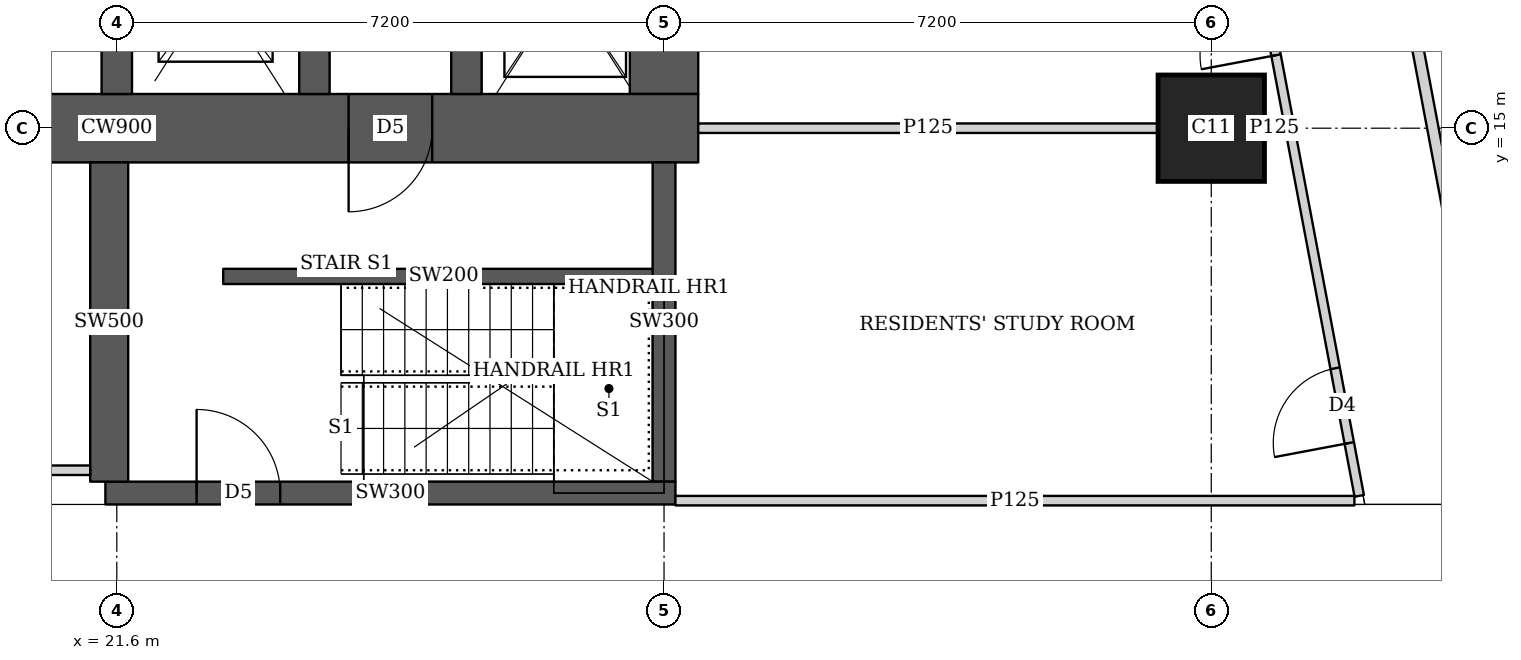
"""IFC4 building model, lengths in metres.
Left out: names, types, materials, properties, quantities, classifications, styles, units other than length and angle.
Written with IfcOpenShell. Run it as: python <this file> out.ifc"""

import sys

from ifc_helpers import new_model, si_unit, direction, frame, frame_2d, origin, origin_2d, place, context, subcontext, project, spatial, rectangle, extrude, element, fill, save


model = new_model("IFC4")
c1 = context("Model", 3, precision=1e-05, world=origin(), true_north=direction((0.0, 1.0)))
c2 = subcontext(c1, "Body", "Model", "MODEL_VIEW")
j1 = project(units=[si_unit("LENGTHUNIT", "METRE"), si_unit("PLANEANGLEUNIT", "RADIAN")], contexts=[c1])
p1 = place(None, origin())
s1 = spatial("IfcSite", under=j1, at=p1, CompositionType="ELEMENT")
p2 = place(p1, origin())
s2 = spatial("IfcBuilding", under=s1, at=p2, CompositionType="ELEMENT")
p3 = place(p2, frame((0.0, 0.0, 281.6)))
s3 = spatial("IfcBuildingStorey", under=s2, at=p3, CompositionType="ELEMENT", Elevation=281.6)
p4 = place(p3, frame((36.0, 15.0, 0.0), z_axis=(0.0, 0.0, 1.0), x_axis=(1.0, 0.0, 0.0)))
e1 = element("IfcColumn", 1, at=p4, inside=s3, PredefinedType="COLUMN", context=c2, shape_type="SweptSolid", body=[
    extrude(rectangle(XDim=1.4, YDim=1.4, at=origin_2d()), origin(), (0.0, 0.0, 1.0), 3.75),
])
p5 = place(p3, frame((13.95, 15.0, 0.0), z_axis=(0.0, 0.0, 1.0), x_axis=(1.0, 0.0, 0.0)))
e2 = element("IfcWall", 2, at=p5, inside=s3, PredefinedType="SHEAR", context=c2, shape_type="SweptSolid", body=[
    extrude(rectangle(XDim=15.3, YDim=0.9, at=frame_2d((7.65, 0.0))), origin(), (0.0, 0.0, 1.0), 3.75),
])
p6 = place(p5, frame((4.45, 0.0, 0.0)))
e3 = element("IfcOpeningElement", 3, at=p6, cuts=e2, PredefinedType="OPENING", context=c2, shape_type="SweptSolid", body=[
    extrude(rectangle(XDim=1.8, YDim=2.1, at=frame_2d((0.9, 1.05))), frame((0.0, 0.46, 0.0), z_axis=(0.0, -1.0, 0.0), x_axis=(1.0, 0.0, 0.0)), (0.0, 0.0, 1.0), 0.92),
])
p7 = place(p5, frame((10.7, 0.0, 0.0)))
e4 = element("IfcOpeningElement", 4, at=p7, cuts=e2, PredefinedType="OPENING", context=c2, shape_type="SweptSolid", body=[
    extrude(rectangle(XDim=1.1, YDim=2.1, at=frame_2d((0.55, 1.05))), frame((0.0, 0.46, 0.0), z_axis=(0.0, -1.0, 0.0), x_axis=(1.0, 0.0, 0.0)), (0.0, 0.0, 1.0), 0.92),
])
p8 = place(p3, frame((28.8, 15.45, 0.0), z_axis=(0.0, 0.0, 1.0), x_axis=(0.0, 1.0, 0.0)))
e5 = element("IfcWall", 5, at=p8, inside=s3, PredefinedType="SHEAR", context=c2, shape_type="SweptSolid", body=[
    extrude(rectangle(XDim=14.1, YDim=0.9, at=frame_2d((7.05, 0.0))), origin(), (0.0, 0.0, 1.0), 3.75),
])
p9 = place(p3, frame((21.6, 15.45, 0.0), z_axis=(0.0, 0.0, 1.0), x_axis=(0.0, 1.0, 0.0)))
e6 = element("IfcWall", 6, at=p9, inside=s3, PredefinedType="SHEAR", context=c2, shape_type="SweptSolid", body=[
    extrude(rectangle(XDim=14.1, YDim=0.4, at=frame_2d((7.05, 0.0))), origin(), (0.0, 0.0, 1.0), 3.75),
])
p10 = place(p9, frame((0.875, 0.0, 0.0)))
e7 = element("IfcOpeningElement", 7, at=p10, cuts=e6, PredefinedType="OPENING", context=c2, shape_type="SweptSolid", body=[
    extrude(rectangle(XDim=1.1, YDim=2.1, at=frame_2d((0.55, 1.05))), frame((0.0, 0.21, 0.0), z_axis=(0.0, -1.0, 0.0), x_axis=(1.0, 0.0, 0.0)), (0.0, 0.0, 1.0), 0.42),
])
p11 = place(p9, frame((4.625, 0.0, 0.0)))
e8 = element("IfcOpeningElement", 8, at=p11, cuts=e6, PredefinedType="OPENING", context=c2, shape_type="SweptSolid", body=[
    extrude(rectangle(XDim=1.1, YDim=2.1, at=frame_2d((0.55, 1.05))), frame((0.0, 0.21, 0.0), z_axis=(0.0, -1.0, 0.0), x_axis=(1.0, 0.0, 0.0)), (0.0, 0.0, 1.0), 0.42),
])
p12 = place(p9, frame((8.375, 0.0, 0.0)))
e9 = element("IfcOpeningElement", 9, at=p12, cuts=e6, PredefinedType="OPENING", context=c2, shape_type="SweptSolid", body=[
    extrude(rectangle(XDim=1.1, YDim=2.1, at=frame_2d((0.55, 1.05))), frame((0.0, 0.21, 0.0), z_axis=(0.0, -1.0, 0.0), x_axis=(1.0, 0.0, 0.0)), (0.0, 0.0, 1.0), 0.42),
])
p13 = place(p9, frame((12.125, 0.0, 0.0)))
e10 = element("IfcOpeningElement", 10, at=p13, cuts=e6, PredefinedType="OPENING", context=c2, shape_type="SweptSolid", body=[
    extrude(rectangle(XDim=1.1, YDim=2.1, at=frame_2d((0.55, 1.05))), frame((0.0, 0.21, 0.0), z_axis=(0.0, -1.0, 0.0), x_axis=(1.0, 0.0, 0.0)), (0.0, 0.0, 1.0), 0.42),
])
p14 = place(p3, frame((24.2, 15.45, 0.0), z_axis=(0.0, 0.0, 1.0), x_axis=(0.0, 1.0, 0.0)))
e11 = element("IfcWall", 11, at=p14, inside=s3, PredefinedType="SHEAR", context=c2, shape_type="SweptSolid", body=[
    extrude(rectangle(XDim=14.1, YDim=0.4, at=frame_2d((7.05, 0.0))), origin(), (0.0, 0.0, 1.0), 3.75),
])
p15 = place(p3, frame((26.2, 15.45, 0.0), z_axis=(0.0, 0.0, 1.0), x_axis=(0.0, 1.0, 0.0)))
e12 = element("IfcWall", 12, at=p15, inside=s3, PredefinedType="SHEAR", context=c2, shape_type="SweptSolid", body=[
    extrude(rectangle(XDim=3.1, YDim=0.4, at=frame_2d((1.55, 0.0))), origin(), (0.0, 0.0, 1.0), 3.75),
])
p16 = place(p15, frame((0.825, 0.0, 0.0)))
e13 = element("IfcOpeningElement", 13, at=p16, cuts=e12, PredefinedType="OPENING", context=c2, shape_type="SweptSolid", body=[
    extrude(rectangle(XDim=1.2, YDim=2.1, at=frame_2d((0.6, 1.05))), frame((0.0, 0.21, 0.0), z_axis=(0.0, -1.0, 0.0), x_axis=(1.0, 0.0, 0.0)), (0.0, 0.0, 1.0), 0.42),
])
p17 = place(p3, frame((21.45, 10.2, 0.0), z_axis=(0.0, 0.0, 1.0), x_axis=(1.0, 0.0, 0.0)))
e14 = element("IfcWall", 14, at=p17, inside=s3, PredefinedType="SHEAR", context=c2, shape_type="SweptSolid", body=[
    extrude(rectangle(XDim=7.5, YDim=0.3, at=frame_2d((3.75, 0.0))), origin(), (0.0, 0.0, 1.0), 3.75),
])
p18 = place(p17, frame((1.2, 0.0, 0.0)))
e15 = element("IfcOpeningElement", 15, at=p18, cuts=e14, PredefinedType="OPENING", context=c2, shape_type="SweptSolid", body=[
    extrude(rectangle(XDim=1.1, YDim=2.1, at=frame_2d((0.55, 1.05))), frame((0.0, 0.16, 0.0), z_axis=(0.0, -1.0, 0.0), x_axis=(1.0, 0.0, 0.0)), (0.0, 0.0, 1.0), 0.32),
])
p19 = place(p3, frame((21.5, 10.35, 0.0), z_axis=(0.0, 0.0, 1.0), x_axis=(0.0, 1.0, 0.0)))
e16 = element("IfcWall", 16, at=p19, inside=s3, PredefinedType="SHEAR", context=c2, shape_type="SweptSolid", body=[
    extrude(rectangle(XDim=4.2, YDim=0.5, at=frame_2d((2.1, 0.0))), origin(), (0.0, 0.0, 1.0), 3.75),
])
p20 = place(p3, frame((28.8, 10.35, 0.0), z_axis=(0.0, 0.0, 1.0), x_axis=(0.0, 1.0, 0.0)))
e17 = element("IfcWall", 17, at=p20, inside=s3, PredefinedType="SHEAR", context=c2, shape_type="SweptSolid", body=[
    extrude(rectangle(XDim=4.2, YDim=0.3, at=frame_2d((2.1, 0.0))), origin(), (0.0, 0.0, 1.0), 3.75),
])
p21 = place(p3, frame((33.781, 42.186, 0.0), z_axis=(0.0, 0.0, 1.0), x_axis=(0.185593518645, -0.9826266055, 0.0)))
e18 = element("IfcWall", 18, at=p21, inside=s3, PredefinedType="SOLIDWALL", context=c2, shape_type="SweptSolid", body=[
    extrude(rectangle(XDim=35.961, YDim=0.15, at=frame_2d((17.98, 0.0))), origin(), (0.0, 0.0, 1.0), 2.5),
])
p22 = place(p21, frame((11.76, 0.0, 0.0)))
e19 = element("IfcOpeningElement", 19, at=p22, cuts=e18, PredefinedType="OPENING", context=c2, shape_type="SweptSolid", body=[
    extrude(rectangle(XDim=1.0, YDim=2.1, at=frame_2d((0.5, 1.05))), frame((0.0, 0.085, 0.0), z_axis=(0.0, -1.0, 0.0), x_axis=(1.0, 0.0, 0.0)), (0.0, 0.0, 1.0), 0.17),
])
p23 = place(p21, frame((15.576, 0.0, 0.0)))
e20 = element("IfcOpeningElement", 20, at=p23, cuts=e18, PredefinedType="OPENING", context=c2, shape_type="SweptSolid", body=[
    extrude(rectangle(XDim=1.0, YDim=2.1, at=frame_2d((0.5, 1.05))), frame((0.0, 0.085, 0.0), z_axis=(0.0, -1.0, 0.0), x_axis=(1.0, 0.0, 0.0)), (0.0, 0.0, 1.0), 0.17),
])
p24 = place(p21, frame((30.502, 0.0, 0.0)))
e21 = element("IfcOpeningElement", 21, at=p24, cuts=e18, PredefinedType="OPENING", context=c2, shape_type="SweptSolid", body=[
    extrude(rectangle(XDim=1.0, YDim=2.1, at=frame_2d((0.5, 1.05))), frame((0.0, 0.085, 0.0), z_axis=(0.0, -1.0, 0.0), x_axis=(1.0, 0.0, 0.0)), (0.0, 0.0, 1.0), 0.17),
])
p25 = place(p3, frame((13.75, 10.5, 0.0), z_axis=(0.0, 0.0, 1.0), x_axis=(1.0, 0.0, 0.0)))
e22 = element("IfcWall", 22, at=p25, inside=s3, PredefinedType="PARTITIONING", context=c2, shape_type="SweptSolid", body=[
    extrude(rectangle(XDim=7.5, YDim=0.125, at=frame_2d((3.75, 0.0))), origin(), (0.0, 0.0, 1.0), 3.5),
])
p26 = place(p25, frame((4.245, 0.0, 0.0)))
e23 = element("IfcOpeningElement", 23, at=p26, cuts=e22, PredefinedType="OPENING", context=c2, shape_type="SweptSolid", body=[
    extrude(rectangle(XDim=1.8, YDim=2.1, at=frame_2d((0.9, 1.05))), frame((0.0, 0.073, 0.0), z_axis=(0.0, -1.0, 0.0), x_axis=(1.0, 0.0, 0.0)), (0.0, 0.0, 1.0), 0.145),
])
p27 = place(p3, frame((28.95, 10.1, 0.0), z_axis=(0.0, 0.0, 1.0), x_axis=(1.0, 0.0, 0.0)))
e24 = element("IfcWall", 24, at=p27, inside=s3, PredefinedType="PARTITIONING", context=c2, shape_type="SweptSolid", body=[
    extrude(rectangle(XDim=8.933, YDim=0.125, at=frame_2d((4.467, 0.0))), origin(), (0.0, 0.0, 1.0), 3.5),
])
p28 = place(p3, frame((37.947, 10.163, 0.0), z_axis=(0.0, 0.0, 1.0), x_axis=(-0.185572770922, 0.982630523998, 0.0)))
e25 = element("IfcWall", 25, at=p28, inside=s3, PredefinedType="PARTITIONING", context=c2, shape_type="SweptSolid", body=[
    extrude(rectangle(XDim=25.111, YDim=0.125, at=frame_2d((12.556, 0.0))), origin(), (0.0, 0.0, 1.0), 2.5),
])
p29 = place(p28, frame((0.708, 0.0, 0.0)))
e26 = element("IfcOpeningElement", 26, at=p29, cuts=e25, PredefinedType="OPENING", context=c2, shape_type="SweptSolid", body=[
    extrude(rectangle(XDim=1.0, YDim=2.1, at=frame_2d((0.5, 1.05))), frame((0.0, 0.073, 0.0), z_axis=(0.0, -1.0, 0.0), x_axis=(1.0, 0.0, 0.0)), (0.0, 0.0, 1.0), 0.145),
])
p30 = place(p28, frame((5.9, 0.0, 0.0)))
e27 = element("IfcOpeningElement", 27, at=p30, cuts=e25, PredefinedType="OPENING", context=c2, shape_type="SweptSolid", body=[
    extrude(rectangle(XDim=1.0, YDim=2.1, at=frame_2d((0.5, 1.05))), frame((0.0, 0.073, 0.0), z_axis=(0.0, -1.0, 0.0), x_axis=(1.0, 0.0, 0.0)), (0.0, 0.0, 1.0), 0.145),
])
p31 = place(p28, frame((13.378, 0.0, 0.0)))
e28 = element("IfcOpeningElement", 28, at=p31, cuts=e25, PredefinedType="OPENING", context=c2, shape_type="SweptSolid", body=[
    extrude(rectangle(XDim=1.0, YDim=2.1, at=frame_2d((0.5, 1.05))), frame((0.0, 0.073, 0.0), z_axis=(0.0, -1.0, 0.0), x_axis=(1.0, 0.0, 0.0)), (0.0, 0.0, 1.0), 0.145),
])
p32 = place(p28, frame((21.15, 0.0, 0.0)))
e29 = element("IfcOpeningElement", 29, at=p32, cuts=e25, PredefinedType="OPENING", context=c2, shape_type="SweptSolid", body=[
    extrude(rectangle(XDim=1.0, YDim=2.1, at=frame_2d((0.5, 1.05))), frame((0.0, 0.073, 0.0), z_axis=(0.0, -1.0, 0.0), x_axis=(1.0, 0.0, 0.0)), (0.0, 0.0, 1.0), 0.145),
])
p33 = place(p3, frame((29.25, 15.0, 0.0), z_axis=(0.0, 0.0, 1.0), x_axis=(1.0, 0.0, 0.0)))
e30 = element("IfcWall", 30, at=p33, inside=s3, PredefinedType="PARTITIONING", context=c2, shape_type="SweptSolid", body=[
    extrude(rectangle(XDim=6.049, YDim=0.125, at=frame_2d((3.024, 0.0))), origin(), (0.0, 0.0, 1.0), 3.5),
])
p34 = place(p3, frame((36.701, 15.0, 0.0), z_axis=(0.0, 0.0, 1.0), x_axis=(1.0, 0.0, 0.0)))
e31 = element("IfcWall", 31, at=p34, inside=s3, PredefinedType="PARTITIONING", context=c2, shape_type="SweptSolid", body=[
    extrude(rectangle(XDim=0.257, YDim=0.125, at=frame_2d((0.128, 0.0))), origin(), (0.0, 0.0, 1.0), 3.5),
])
p35 = place(p3, frame((23.0, 13.05, 0.0), z_axis=(0.0, 0.0, 1.0), x_axis=(1.0, 0.0, 0.0)))
e32 = element("IfcWall", 32, at=p35, inside=s3, PredefinedType="SHEAR", context=c2, shape_type="SweptSolid", body=[
    extrude(rectangle(XDim=5.8, YDim=0.2, at=frame_2d((2.9, 0.0))), origin(), (0.0, 0.0, 1.0), 3.75),
])
p36 = place(p29, origin())
e33 = element("IfcDoor", 33, at=p36, inside=s3, OperationType="SINGLE_SWING_LEFT", PredefinedType="DOOR", context=c2, shape_type="SweptSolid", body=[
    extrude(rectangle(XDim=1.0, YDim=2.1, at=frame_2d((0.5, 1.05))), frame((0.0, 0.025, 0.0), z_axis=(0.0, -1.0, 0.0), x_axis=(1.0, 0.0, 0.0)), (0.0, 0.0, 1.0), 0.05),
])
fill(e26, e33)
p37 = place(p30, origin())
e34 = element("IfcDoor", 34, at=p37, inside=s3, OperationType="SINGLE_SWING_LEFT", PredefinedType="DOOR", context=c2, shape_type="SweptSolid", body=[
    extrude(rectangle(XDim=1.0, YDim=2.1, at=frame_2d((0.5, 1.05))), frame((0.0, 0.025, 0.0), z_axis=(0.0, -1.0, 0.0), x_axis=(1.0, 0.0, 0.0)), (0.0, 0.0, 1.0), 0.05),
])
fill(e27, e34)
p38 = place(p7, origin())
e35 = element("IfcDoor", 35, at=p38, inside=s3, OperationType="SINGLE_SWING_RIGHT", PredefinedType="DOOR", context=c2, shape_type="SweptSolid", body=[
    extrude(rectangle(XDim=1.1, YDim=2.1, at=frame_2d((0.55, 1.05))), frame((0.0, 0.025, 0.0), z_axis=(0.0, -1.0, 0.0), x_axis=(1.0, 0.0, 0.0)), (0.0, 0.0, 1.0), 0.05),
])
fill(e4, e35)
p39 = place(p18, origin())
e36 = element("IfcDoor", 36, at=p39, inside=s3, OperationType="SINGLE_SWING_LEFT", PredefinedType="DOOR", context=c2, shape_type="SweptSolid", body=[
    extrude(rectangle(XDim=1.1, YDim=2.1, at=frame_2d((0.55, 1.05))), frame((0.0, 0.025, 0.0), z_axis=(0.0, -1.0, 0.0), x_axis=(1.0, 0.0, 0.0)), (0.0, 0.0, 1.0), 0.05),
])
fill(e15, e36)
save(model, sys.argv[1])
